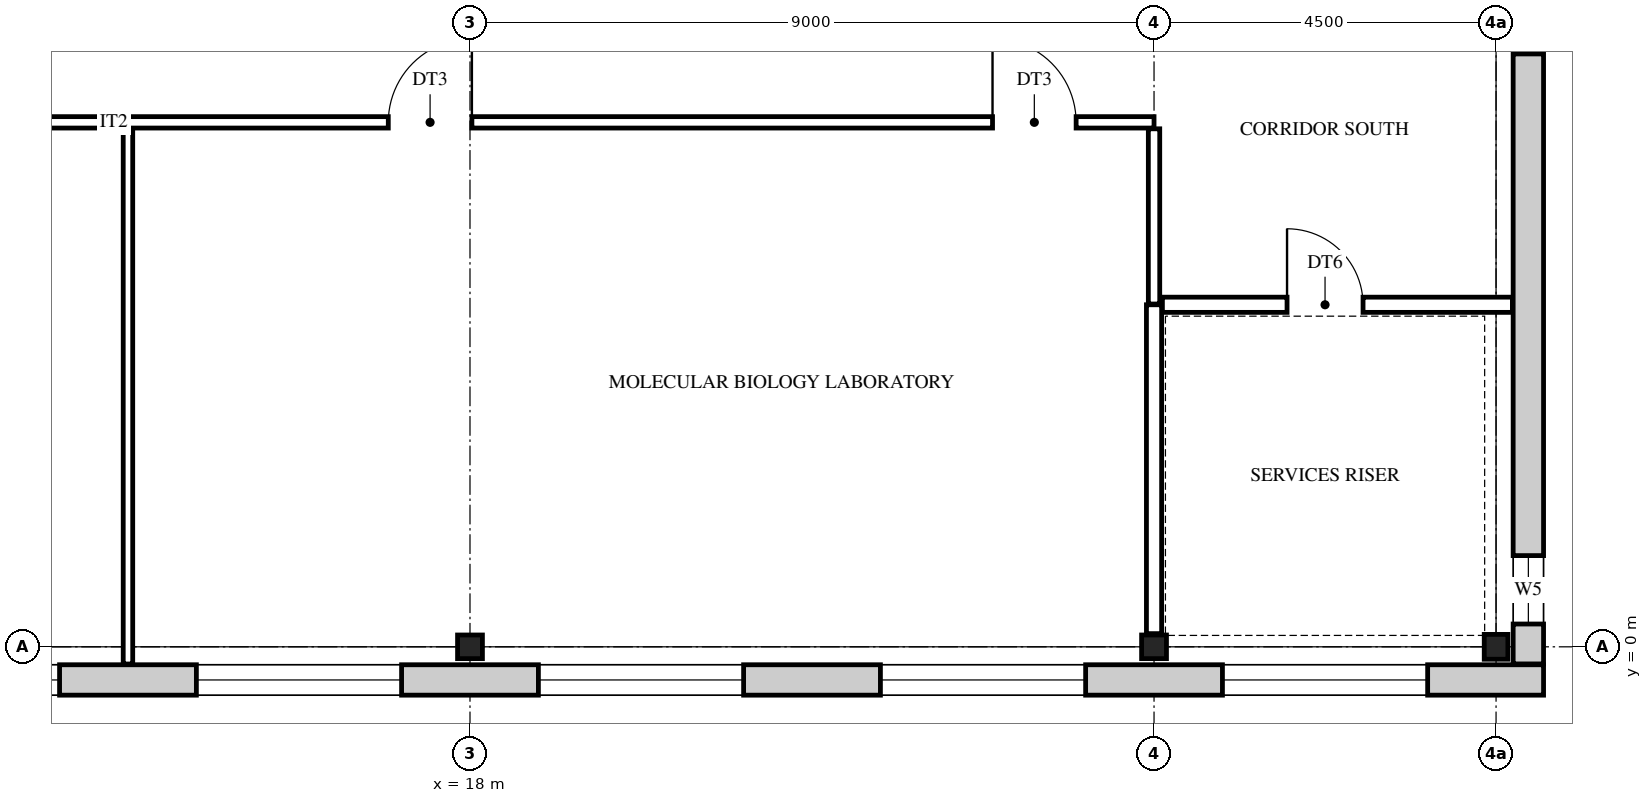
"""IFC4 building model, lengths in metres.
Left out: names, types, materials, properties, quantities, classifications, styles, units other than length and angle.
Written with IfcOpenShell. Run it as: python <this file> out.ifc"""

import sys

from ifc_helpers import new_model, si_unit, direction, frame, frame_2d, origin, origin_2d, place, context, subcontext, project, spatial, rectangle, i_section, extrude, element, fill, save


model = new_model("IFC4")
c1 = context("Model", 3, precision=1e-05, world=origin(), true_north=direction((0.0, 1.0)))
c2 = subcontext(c1, "Body", "Model", "MODEL_VIEW")
j1 = project(units=[si_unit("LENGTHUNIT", "METRE"), si_unit("PLANEANGLEUNIT", "RADIAN")], contexts=[c1])
p1 = place(None, origin())
s1 = spatial("IfcSite", under=j1, at=p1, CompositionType="ELEMENT")
p2 = place(p1, origin())
s2 = spatial("IfcBuilding", under=s1, at=p2, CompositionType="ELEMENT")
p3 = place(p2, frame((0.0, 0.0, 31.8)))
s3 = spatial("IfcBuildingStorey", under=s2, at=p3, CompositionType="ELEMENT", Elevation=31.8)
for number, where, z_axis, x_axis in (
    (1, (18.0, 0.0, 0.0), (0.0, 0.0, 1.0), (0.0, 1.0, 0.0)),
    (2, (27.0, 0.0, 0.0), (0.0, 0.0, 1.0), (0.0, 1.0, 0.0)),
    (3, (31.5, 0.0, 0.0), (0.0, 0.0, 1.0), (1.0, 0.0, 0.0)),
):
    element("IfcColumn", number, at=place(p3, frame(where, z_axis=z_axis, x_axis=x_axis)), inside=s3, PredefinedType="COLUMN", context=c2, shape_type="SweptSolid", body=[
        extrude(i_section(OverallWidth=0.311, OverallDepth=0.327, WebThickness=0.016, FlangeThickness=0.025, FilletRadius=0.017, at=origin_2d()), origin(), (0.0, 0.0, 1.0), 4.2),
    ])
p4 = place(p3, frame((32.125, -0.436, 0.0), z_axis=(0.0, 0.0, 1.0), x_axis=(-1.0, 0.0, 0.0)))
e4 = element("IfcWall", 4, at=p4, inside=s3, PredefinedType="STANDARD", context=c2, shape_type="SweptSolid", body=[
    extrude(rectangle(XDim=32.75, YDim=0.4, at=frame_2d((16.375, 0.0))), origin(), (0.0, 0.0, 1.0), 4.2),
])
p5 = place(p4, frame((28.525, 0.0, 0.9)))
e5 = element("IfcOpeningElement", 5, at=p5, cuts=e4, PredefinedType="OPENING", context=c2, shape_type="SweptSolid", body=[
    extrude(rectangle(XDim=2.7, YDim=2.5, at=frame_2d((1.35, 1.25))), frame((0.0, 0.21, 0.0), z_axis=(0.0, -1.0, 0.0), x_axis=(1.0, 0.0, 0.0)), (0.0, 0.0, 1.0), 0.42),
])
p6 = place(p4, frame((24.025, 0.0, 0.9)))
e6 = element("IfcOpeningElement", 6, at=p6, cuts=e4, PredefinedType="OPENING", context=c2, shape_type="SweptSolid", body=[
    extrude(rectangle(XDim=2.7, YDim=2.5, at=frame_2d((1.35, 1.25))), frame((0.0, 0.21, 0.0), z_axis=(0.0, -1.0, 0.0), x_axis=(1.0, 0.0, 0.0)), (0.0, 0.0, 1.0), 0.42),
])
p7 = place(p4, frame((19.525, 0.0, 0.9)))
e7 = element("IfcOpeningElement", 7, at=p7, cuts=e4, PredefinedType="OPENING", context=c2, shape_type="SweptSolid", body=[
    extrude(rectangle(XDim=2.7, YDim=2.5, at=frame_2d((1.35, 1.25))), frame((0.0, 0.21, 0.0), z_axis=(0.0, -1.0, 0.0), x_axis=(1.0, 0.0, 0.0)), (0.0, 0.0, 1.0), 0.42),
])
p8 = place(p4, frame((15.025, 0.0, 0.9)))
e8 = element("IfcOpeningElement", 8, at=p8, cuts=e4, PredefinedType="OPENING", context=c2, shape_type="SweptSolid", body=[
    extrude(rectangle(XDim=2.7, YDim=2.5, at=frame_2d((1.35, 1.25))), frame((0.0, 0.21, 0.0), z_axis=(0.0, -1.0, 0.0), x_axis=(1.0, 0.0, 0.0)), (0.0, 0.0, 1.0), 0.42),
])
p9 = place(p4, frame((10.525, 0.0, 0.9)))
e9 = element("IfcOpeningElement", 9, at=p9, cuts=e4, PredefinedType="OPENING", context=c2, shape_type="SweptSolid", body=[
    extrude(rectangle(XDim=2.7, YDim=2.5, at=frame_2d((1.35, 1.25))), frame((0.0, 0.21, 0.0), z_axis=(0.0, -1.0, 0.0), x_axis=(1.0, 0.0, 0.0)), (0.0, 0.0, 1.0), 0.42),
])
p10 = place(p4, frame((6.025, 0.0, 0.9)))
e10 = element("IfcOpeningElement", 10, at=p10, cuts=e4, PredefinedType="OPENING", context=c2, shape_type="SweptSolid", body=[
    extrude(rectangle(XDim=2.7, YDim=2.5, at=frame_2d((1.35, 1.25))), frame((0.0, 0.21, 0.0), z_axis=(0.0, -1.0, 0.0), x_axis=(1.0, 0.0, 0.0)), (0.0, 0.0, 1.0), 0.42),
])
p11 = place(p4, frame((1.525, 0.0, 0.9)))
e11 = element("IfcOpeningElement", 11, at=p11, cuts=e4, PredefinedType="OPENING", context=c2, shape_type="SweptSolid", body=[
    extrude(rectangle(XDim=2.7, YDim=2.5, at=frame_2d((1.35, 1.25))), frame((0.0, 0.21, 0.0), z_axis=(0.0, -1.0, 0.0), x_axis=(1.0, 0.0, 0.0)), (0.0, 0.0, 1.0), 0.42),
])
p12 = place(p3, frame((31.925, 27.225, 0.0), z_axis=(0.0, 0.0, 1.0), x_axis=(0.0, -1.0, 0.0)))
e12 = element("IfcWall", 12, at=p12, inside=s3, PredefinedType="STANDARD", context=c2, shape_type="SweptSolid", body=[
    extrude(rectangle(XDim=27.45, YDim=0.4, at=frame_2d((13.725, 0.0))), origin(), (0.0, 0.0, 1.0), 4.2),
])
p13 = place(p12, frame((26.025, 0.0, 0.9)))
e13 = element("IfcOpeningElement", 13, at=p13, cuts=e12, PredefinedType="OPENING", context=c2, shape_type="SweptSolid", body=[
    extrude(rectangle(XDim=0.9, YDim=2.0, at=frame_2d((0.45, 1.0))), frame((0.0, 0.21, 0.0), z_axis=(0.0, -1.0, 0.0), x_axis=(1.0, 0.0, 0.0)), (0.0, 0.0, 1.0), 0.42),
])
p14 = place(p12, frame((18.525, 0.0, 0.9)))
e14 = element("IfcOpeningElement", 14, at=p14, cuts=e12, PredefinedType="OPENING", context=c2, shape_type="SweptSolid", body=[
    extrude(rectangle(XDim=0.9, YDim=2.0, at=frame_2d((0.45, 1.0))), frame((0.0, 0.21, 0.0), z_axis=(0.0, -1.0, 0.0), x_axis=(1.0, 0.0, 0.0)), (0.0, 0.0, 1.0), 0.42),
])
p15 = place(p12, frame((15.675, 0.0, 1.6)))
e15 = element("IfcOpeningElement", 15, at=p15, cuts=e12, PredefinedType="OPENING", context=c2, shape_type="SweptSolid", body=[
    extrude(rectangle(XDim=0.6, YDim=0.9, at=frame_2d((0.3, 0.45))), frame((0.0, 0.21, 0.0), z_axis=(0.0, -1.0, 0.0), x_axis=(1.0, 0.0, 0.0)), (0.0, 0.0, 1.0), 0.42),
])
p16 = place(p12, frame((11.175, 0.0, 1.6)))
e16 = element("IfcOpeningElement", 16, at=p16, cuts=e12, PredefinedType="OPENING", context=c2, shape_type="SweptSolid", body=[
    extrude(rectangle(XDim=0.6, YDim=0.9, at=frame_2d((0.3, 0.45))), frame((0.0, 0.21, 0.0), z_axis=(0.0, -1.0, 0.0), x_axis=(1.0, 0.0, 0.0)), (0.0, 0.0, 1.0), 0.42),
])
p17 = place(p12, frame((8.025, 0.0, 0.9)))
e17 = element("IfcOpeningElement", 17, at=p17, cuts=e12, PredefinedType="OPENING", context=c2, shape_type="SweptSolid", body=[
    extrude(rectangle(XDim=0.9, YDim=2.0, at=frame_2d((0.45, 1.0))), frame((0.0, 0.21, 0.0), z_axis=(0.0, -1.0, 0.0), x_axis=(1.0, 0.0, 0.0)), (0.0, 0.0, 1.0), 0.42),
])
p18 = place(p12, frame((0.525, 0.0, 0.9)))
e18 = element("IfcOpeningElement", 18, at=p18, cuts=e12, PredefinedType="OPENING", context=c2, shape_type="SweptSolid", body=[
    extrude(rectangle(XDim=0.9, YDim=2.0, at=frame_2d((0.45, 1.0))), frame((0.0, 0.21, 0.0), z_axis=(0.0, -1.0, 0.0), x_axis=(1.0, 0.0, 0.0)), (0.0, 0.0, 1.0), 0.42),
])
p19 = place(p3, frame((13.5, -0.226, 0.0), z_axis=(0.0, 0.0, 1.0), x_axis=(0.0, 1.0, 0.0)))
e19 = element("IfcWall", 19, at=p19, inside=s3, PredefinedType="PARTITIONING", context=c2, shape_type="SweptSolid", body=[
    extrude(rectangle(XDim=7.041, YDim=0.125, at=frame_2d((3.521, 0.0))), origin(), (0.0, 0.0, 1.0), 3.537),
])
p20 = place(p3, frame((27.0, 0.174, 0.0), z_axis=(0.0, 0.0, 1.0), x_axis=(0.0, 1.0, 0.0)))
e20 = element("IfcWall", 20, at=p20, inside=s3, PredefinedType="PARTITIONING", context=c2, shape_type="SweptSolid", body=[
    extrude(rectangle(XDim=4.326, YDim=0.2, at=frame_2d((2.163, 0.0))), origin(), (0.0, 0.0, 1.0), 3.537),
])
p21 = place(p3, frame((27.0, 4.51, 0.0), z_axis=(0.0, 0.0, 1.0), x_axis=(0.0, 1.0, 0.0)))
e21 = element("IfcWall", 21, at=p21, inside=s3, PredefinedType="PARTITIONING", context=c2, shape_type="SweptSolid", body=[
    extrude(rectangle(XDim=2.305, YDim=0.15, at=frame_2d((1.152, 0.0))), origin(), (0.0, 0.0, 1.0), 3.537),
])
p22 = place(p3, frame((27.11, 4.5, 0.0), z_axis=(0.0, 0.0, 1.0), x_axis=(1.0, 0.0, 0.0)))
e22 = element("IfcWall", 22, at=p22, inside=s3, PredefinedType="PARTITIONING", context=c2, shape_type="SweptSolid", body=[
    extrude(rectangle(XDim=4.605, YDim=0.2, at=frame_2d((2.302, 0.0))), origin(), (0.0, 0.0, 1.0), 3.537),
])
p23 = place(p22, frame((1.64, 0.0, 0.0)))
e23 = element("IfcOpeningElement", 23, at=p23, cuts=e22, PredefinedType="OPENING", context=c2, shape_type="SweptSolid", body=[
    extrude(rectangle(XDim=1.0, YDim=2.1, at=frame_2d((0.5, 1.05))), frame((0.0, 0.11, 0.0), z_axis=(0.0, -1.0, 0.0), x_axis=(1.0, 0.0, 0.0)), (0.0, 0.0, 1.0), 0.22),
])
p24 = place(p3, frame((6.9, 6.9, 0.0), z_axis=(0.0, 0.0, 1.0), x_axis=(1.0, 0.0, 0.0)))
e24 = element("IfcWall", 24, at=p24, inside=s3, PredefinedType="PARTITIONING", context=c2, shape_type="SweptSolid", body=[
    extrude(rectangle(XDim=20.1, YDim=0.15, at=frame_2d((10.05, 0.0))), origin(), (0.0, 0.0, 1.0), 3.537),
])
p25 = place(p24, frame((1.7, 0.0, 0.0)))
e25 = element("IfcOpeningElement", 25, at=p25, cuts=e24, PredefinedType="OPENING", context=c2, shape_type="SweptSolid", body=[
    extrude(rectangle(XDim=1.1, YDim=2.1, at=frame_2d((0.55, 1.05))), frame((0.0, 0.085, 0.0), z_axis=(0.0, -1.0, 0.0), x_axis=(1.0, 0.0, 0.0)), (0.0, 0.0, 1.0), 0.17),
])
p26 = place(p24, frame((17.975, 0.0, 0.0)))
e26 = element("IfcOpeningElement", 26, at=p26, cuts=e24, PredefinedType="OPENING", context=c2, shape_type="SweptSolid", body=[
    extrude(rectangle(XDim=1.1, YDim=2.1, at=frame_2d((0.55, 1.05))), frame((0.0, 0.085, 0.0), z_axis=(0.0, -1.0, 0.0), x_axis=(1.0, 0.0, 0.0)), (0.0, 0.0, 1.0), 0.17),
])
p27 = place(p24, frame((10.025, 0.0, 0.0)))
e27 = element("IfcOpeningElement", 27, at=p27, cuts=e24, PredefinedType="OPENING", context=c2, shape_type="SweptSolid", body=[
    extrude(rectangle(XDim=1.1, YDim=2.1, at=frame_2d((0.55, 1.05))), frame((0.0, 0.085, 0.0), z_axis=(0.0, -1.0, 0.0), x_axis=(1.0, 0.0, 0.0)), (0.0, 0.0, 1.0), 0.17),
])
p28 = place(p7, origin())
e28 = element("IfcWindow", 28, at=p28, inside=s3, PartitioningType="SINGLE_PANEL", PredefinedType="WINDOW", context=c2, shape_type="SweptSolid", body=[
    extrude(rectangle(XDim=2.7, YDim=2.5, at=frame_2d((1.35, 1.25))), frame((0.0, 0.03, 0.0), z_axis=(0.0, -1.0, 0.0), x_axis=(1.0, 0.0, 0.0)), (0.0, 0.0, 1.0), 0.06),
])
fill(e7, e28)
p29 = place(p8, origin())
e29 = element("IfcWindow", 29, at=p29, inside=s3, PartitioningType="SINGLE_PANEL", PredefinedType="WINDOW", context=c2, shape_type="SweptSolid", body=[
    extrude(rectangle(XDim=2.7, YDim=2.5, at=frame_2d((1.35, 1.25))), frame((0.0, 0.03, 0.0), z_axis=(0.0, -1.0, 0.0), x_axis=(1.0, 0.0, 0.0)), (0.0, 0.0, 1.0), 0.06),
])
fill(e8, e29)
p30 = place(p9, origin())
e30 = element("IfcWindow", 30, at=p30, inside=s3, PartitioningType="SINGLE_PANEL", PredefinedType="WINDOW", context=c2, shape_type="SweptSolid", body=[
    extrude(rectangle(XDim=2.7, YDim=2.5, at=frame_2d((1.35, 1.25))), frame((0.0, 0.03, 0.0), z_axis=(0.0, -1.0, 0.0), x_axis=(1.0, 0.0, 0.0)), (0.0, 0.0, 1.0), 0.06),
])
fill(e9, e30)
p31 = place(p10, origin())
e31 = element("IfcWindow", 31, at=p31, inside=s3, PartitioningType="SINGLE_PANEL", PredefinedType="WINDOW", context=c2, shape_type="SweptSolid", body=[
    extrude(rectangle(XDim=2.7, YDim=2.5, at=frame_2d((1.35, 1.25))), frame((0.0, 0.03, 0.0), z_axis=(0.0, -1.0, 0.0), x_axis=(1.0, 0.0, 0.0)), (0.0, 0.0, 1.0), 0.06),
])
fill(e10, e31)
p32 = place(p11, origin())
e32 = element("IfcWindow", 32, at=p32, inside=s3, PartitioningType="SINGLE_PANEL", PredefinedType="WINDOW", context=c2, shape_type="SweptSolid", body=[
    extrude(rectangle(XDim=2.7, YDim=2.5, at=frame_2d((1.35, 1.25))), frame((0.0, 0.03, 0.0), z_axis=(0.0, -1.0, 0.0), x_axis=(1.0, 0.0, 0.0)), (0.0, 0.0, 1.0), 0.06),
])
fill(e11, e32)
p33 = place(p13, origin())
e33 = element("IfcWindow", 33, at=p33, inside=s3, PartitioningType="SINGLE_PANEL", PredefinedType="WINDOW", context=c2, shape_type="SweptSolid", body=[
    extrude(rectangle(XDim=0.9, YDim=2.0, at=frame_2d((0.45, 1.0))), frame((0.0, 0.03, 0.0), z_axis=(0.0, -1.0, 0.0), x_axis=(1.0, 0.0, 0.0)), (0.0, 0.0, 1.0), 0.06),
])
fill(e13, e33)
p34 = place(p14, origin())
e34 = element("IfcWindow", 34, at=p34, inside=s3, PartitioningType="SINGLE_PANEL", PredefinedType="WINDOW", context=c2, shape_type="SweptSolid", body=[
    extrude(rectangle(XDim=0.9, YDim=2.0, at=frame_2d((0.45, 1.0))), frame((0.0, 0.03, 0.0), z_axis=(0.0, -1.0, 0.0), x_axis=(1.0, 0.0, 0.0)), (0.0, 0.0, 1.0), 0.06),
])
fill(e14, e34)
p35 = place(p23, frame((1.0, 0.0, 0.0), z_axis=(0.0, 0.0, 1.0), x_axis=(-1.0, 0.0, 0.0)))
e35 = element("IfcDoor", 35, at=p35, inside=s3, OperationType="SINGLE_SWING_LEFT", PredefinedType="DOOR", context=c2, shape_type="SweptSolid", body=[
    extrude(rectangle(XDim=1.0, YDim=2.1, at=frame_2d((0.5, 1.05))), frame((0.0, 0.025, 0.0), z_axis=(0.0, -1.0, 0.0), x_axis=(1.0, 0.0, 0.0)), (0.0, 0.0, 1.0), 0.05),
])
fill(e23, e35)
p36 = place(p26, frame((1.1, 0.0, 0.0), z_axis=(0.0, 0.0, 1.0), x_axis=(-1.0, 0.0, 0.0)))
e36 = element("IfcDoor", 36, at=p36, inside=s3, OperationType="SINGLE_SWING_LEFT", PredefinedType="DOOR", context=c2, shape_type="SweptSolid", body=[
    extrude(rectangle(XDim=1.1, YDim=2.1, at=frame_2d((0.55, 1.05))), frame((0.0, 0.025, 0.0), z_axis=(0.0, -1.0, 0.0), x_axis=(1.0, 0.0, 0.0)), (0.0, 0.0, 1.0), 0.05),
])
fill(e26, e36)
p37 = place(p27, frame((1.1, 0.0, 0.0), z_axis=(0.0, 0.0, 1.0), x_axis=(-1.0, 0.0, 0.0)))
e37 = element("IfcDoor", 37, at=p37, inside=s3, OperationType="SINGLE_SWING_RIGHT", PredefinedType="DOOR", context=c2, shape_type="SweptSolid", body=[
    extrude(rectangle(XDim=1.1, YDim=2.1, at=frame_2d((0.55, 1.05))), frame((0.0, 0.025, 0.0), z_axis=(0.0, -1.0, 0.0), x_axis=(1.0, 0.0, 0.0)), (0.0, 0.0, 1.0), 0.05),
])
fill(e27, e37)
save(model, sys.argv[1])
